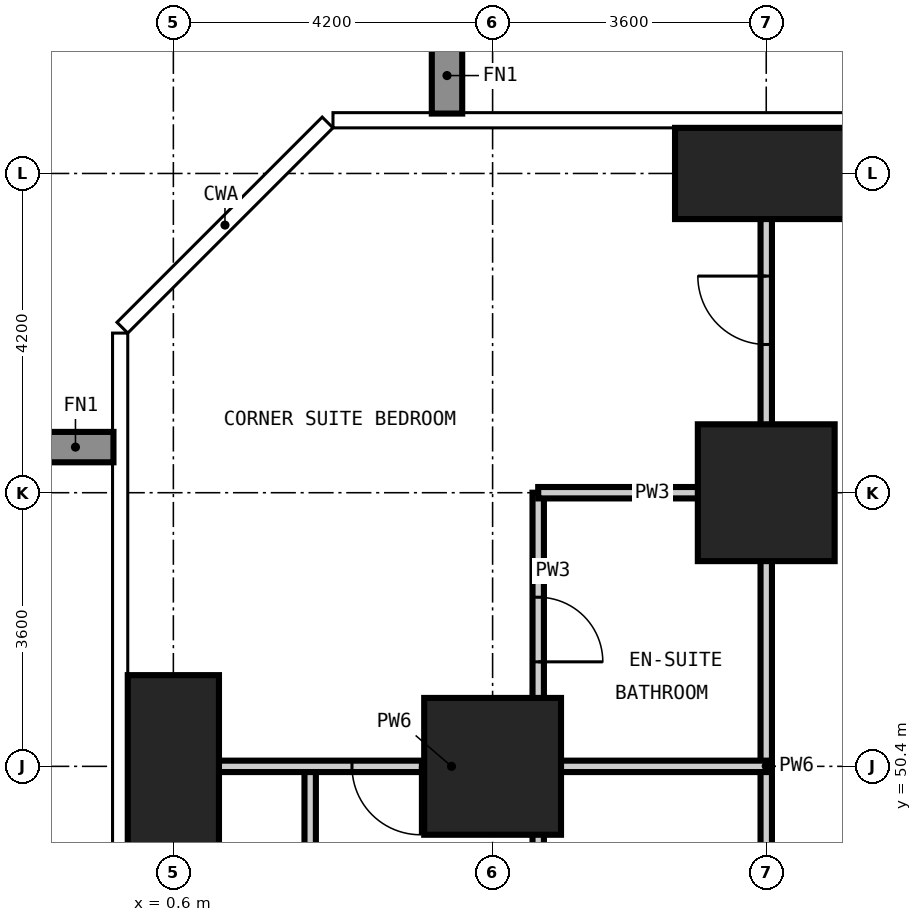
"""IFC4 building model, lengths in metres.
Left out: names, types, materials, properties, quantities, classifications, styles, units other than length and angle.
Written with IfcOpenShell. Run it as: python <this file> out.ifc"""

import sys

from ifc_helpers import new_model, si_unit, direction, frame, frame_2d, origin, origin_2d, place, context, subcontext, project, spatial, rectangle, extrude, element, fill, save


model = new_model("IFC4")
c1 = context("Model", 3, precision=1e-05, world=origin(), true_north=direction((0.0, 1.0)))
c2 = subcontext(c1, "Body", "Model", "MODEL_VIEW")
j1 = project(units=[si_unit("LENGTHUNIT", "METRE"), si_unit("PLANEANGLEUNIT", "RADIAN")], contexts=[c1])
p1 = place(None, origin())
s1 = spatial("IfcSite", under=j1, at=p1, CompositionType="ELEMENT")
p2 = place(p1, origin())
s2 = spatial("IfcBuilding", under=s1, at=p2, CompositionType="ELEMENT")
p3 = place(p2, frame((0.0, 0.0, 70.2)))
s3 = spatial("IfcBuildingStorey", under=s2, at=p3, CompositionType="ELEMENT", Elevation=70.2)
p4 = place(p3, frame((0.6, 50.4, -0.35), z_axis=(0.0, 0.0, 1.0), x_axis=(1.0, 0.0, 0.0)))
e1 = element("IfcColumn", 1, at=p4, inside=s3, PredefinedType="COLUMN", context=c2, shape_type="SweptSolid", body=[
    extrude(rectangle(XDim=1.2, YDim=2.4, at=origin_2d()), origin(), (0.0, 0.0, 1.0), 3.6),
])
for number, where, z_axis, x_axis in (
    (2, (4.8, 50.4, -0.35), (0.0, 0.0, 1.0), (1.0, 0.0, 0.0)),
    (3, (8.4, 54.0, -0.35), (0.0, 0.0, 1.0), (1.0, 0.0, 0.0)),
):
    element("IfcColumn", number, at=place(p3, frame(where, z_axis=z_axis, x_axis=x_axis)), inside=s3, PredefinedType="COLUMN", context=c2, shape_type="SweptSolid", body=[
        extrude(rectangle(XDim=1.8, YDim=1.8, at=origin_2d()), origin(), (0.0, 0.0, 1.0), 3.6),
    ])
p5 = place(p3, frame((8.4, 58.2, -0.35), z_axis=(0.0, 0.0, 1.0), x_axis=(1.0, 0.0, 0.0)))
e4 = element("IfcColumn", 4, at=p5, inside=s3, PredefinedType="COLUMN", context=c2, shape_type="SweptSolid", body=[
    extrude(rectangle(XDim=2.4, YDim=1.2, at=origin_2d()), origin(), (0.0, 0.0, 1.0), 3.6),
])
p6 = place(p3, frame((5.4, 50.4, 0.0), z_axis=(0.0, 0.0, 1.0), x_axis=(0.0, 1.0, 0.0)))
e5 = element("IfcWall", 5, at=p6, inside=s3, PredefinedType="PARTITIONING", context=c2, shape_type="SweptSolid", body=[
    extrude(rectangle(XDim=3.6, YDim=0.15, at=frame_2d((1.8, 0.0))), origin(), (0.0, 0.0, 1.0), 3.25),
])
p7 = place(p6, frame((1.375, 0.0, 0.0)))
e6 = element("IfcOpeningElement", 6, at=p7, cuts=e5, PredefinedType="OPENING", context=c2, shape_type="SweptSolid", body=[
    extrude(rectangle(XDim=0.85, YDim=2.1, at=frame_2d((0.425, 1.05))), frame((0.0, 0.085, 0.0), z_axis=(0.0, -1.0, 0.0), x_axis=(1.0, 0.0, 0.0)), (0.0, 0.0, 1.0), 0.17),
])
p8 = place(p3, frame((5.4, 54.0, 0.0), z_axis=(0.0, 0.0, 1.0), x_axis=(1.0, 0.0, 0.0)))
e7 = element("IfcWall", 7, at=p8, inside=s3, PredefinedType="PARTITIONING", context=c2, shape_type="SweptSolid", body=[
    extrude(rectangle(XDim=3.0, YDim=0.15, at=frame_2d((1.5, 0.0))), origin(), (0.0, 0.0, 1.0), 3.25),
])
for number, where, z_axis, x_axis in (
    (8, (2.4, 48.0, 0.0), (0.0, 0.0, 1.0), (0.0, 1.0, 0.0)),
    (9, (5.4, 48.0, 0.0), (0.0, 0.0, 1.0), (0.0, 1.0, 0.0)),
):
    element("IfcWall", number, at=place(p3, frame(where, z_axis=z_axis, x_axis=x_axis)), inside=s3, PredefinedType="PARTITIONING", context=c2, shape_type="SweptSolid", body=[
        extrude(rectangle(XDim=2.4, YDim=0.15, at=frame_2d((1.2, 0.0))), origin(), (0.0, 0.0, 1.0), 3.25),
    ])
p9 = place(p3, frame((8.4, 42.0, 0.0), z_axis=(0.0, 0.0, 1.0), x_axis=(0.0, 1.0, 0.0)))
e10 = element("IfcWall", 10, at=p9, inside=s3, PredefinedType="PARTITIONING", context=c2, shape_type="SweptSolid", body=[
    extrude(rectangle(XDim=16.808, YDim=0.15, at=frame_2d((8.404, 0.0))), origin(), (0.0, 0.0, 1.0), 3.25),
])
p10 = place(p9, frame((13.95, 0.0, 0.0)))
e11 = element("IfcOpeningElement", 11, at=p10, cuts=e10, PredefinedType="OPENING", context=c2, shape_type="SweptSolid", body=[
    extrude(rectangle(XDim=0.9, YDim=2.1, at=frame_2d((0.45, 1.05))), frame((0.0, 0.085, 0.0), z_axis=(0.0, -1.0, 0.0), x_axis=(1.0, 0.0, 0.0)), (0.0, 0.0, 1.0), 0.17),
])
p11 = place(p9, frame((3.75, 0.0, 0.0)))
e12 = element("IfcOpeningElement", 12, at=p11, cuts=e10, PredefinedType="OPENING", context=c2, shape_type="SweptSolid", body=[
    extrude(rectangle(XDim=0.9, YDim=2.1, at=frame_2d((0.45, 1.05))), frame((0.0, 0.085, 0.0), z_axis=(0.0, -1.0, 0.0), x_axis=(1.0, 0.0, 0.0)), (0.0, 0.0, 1.0), 0.17),
])
p12 = place(p3, frame((-0.008, 50.4, 0.0), z_axis=(0.0, 0.0, 1.0), x_axis=(1.0, 0.0, 0.0)))
e13 = element("IfcWall", 13, at=p12, inside=s3, PredefinedType="PARTITIONING", context=c2, shape_type="SweptSolid", body=[
    extrude(rectangle(XDim=8.408, YDim=0.15, at=frame_2d((4.204, 0.0))), origin(), (0.0, 0.0, 1.0), 3.25),
])
p13 = place(p12, frame((2.958, 0.0, 0.0)))
e14 = element("IfcOpeningElement", 14, at=p13, cuts=e13, PredefinedType="OPENING", context=c2, shape_type="SweptSolid", body=[
    extrude(rectangle(XDim=0.9, YDim=2.1, at=frame_2d((0.45, 1.05))), frame((0.0, 0.085, 0.0), z_axis=(0.0, -1.0, 0.0), x_axis=(1.0, 0.0, 0.0)), (0.0, 0.0, 1.0), 0.17),
])
p14 = place(p10, origin())
e15 = element("IfcDoor", 15, at=p14, inside=s3, OperationType="SINGLE_SWING_RIGHT", PredefinedType="DOOR", context=c2, shape_type="SweptSolid", body=[
    extrude(rectangle(XDim=0.9, YDim=2.1, at=frame_2d((0.45, 1.05))), frame((0.0, 0.025, 0.0), z_axis=(0.0, -1.0, 0.0), x_axis=(1.0, 0.0, 0.0)), (0.0, 0.0, 1.0), 0.05),
])
fill(e11, e15)
p15 = place(p7, frame((0.85, 0.0, 0.0), z_axis=(0.0, 0.0, 1.0), x_axis=(-1.0, 0.0, 0.0)))
e16 = element("IfcDoor", 16, at=p15, inside=s3, OperationType="SINGLE_SWING_RIGHT", PredefinedType="DOOR", context=c2, shape_type="SweptSolid", body=[
    extrude(rectangle(XDim=0.85, YDim=2.1, at=frame_2d((0.425, 1.05))), frame((0.0, 0.025, 0.0), z_axis=(0.0, -1.0, 0.0), x_axis=(1.0, 0.0, 0.0)), (0.0, 0.0, 1.0), 0.05),
])
fill(e6, e16)
p16 = place(p13, frame((0.9, 0.0, 0.0), z_axis=(0.0, 0.0, 1.0), x_axis=(-1.0, 0.0, 0.0)))
e17 = element("IfcDoor", 17, at=p16, inside=s3, OperationType="SINGLE_SWING_LEFT", PredefinedType="DOOR", context=c2, shape_type="SweptSolid", body=[
    extrude(rectangle(XDim=0.9, YDim=2.1, at=frame_2d((0.45, 1.05))), frame((0.0, 0.025, 0.0), z_axis=(0.0, -1.0, 0.0), x_axis=(1.0, 0.0, 0.0)), (0.0, 0.0, 1.0), 0.05),
])
fill(e14, e17)
save(model, sys.argv[1])
